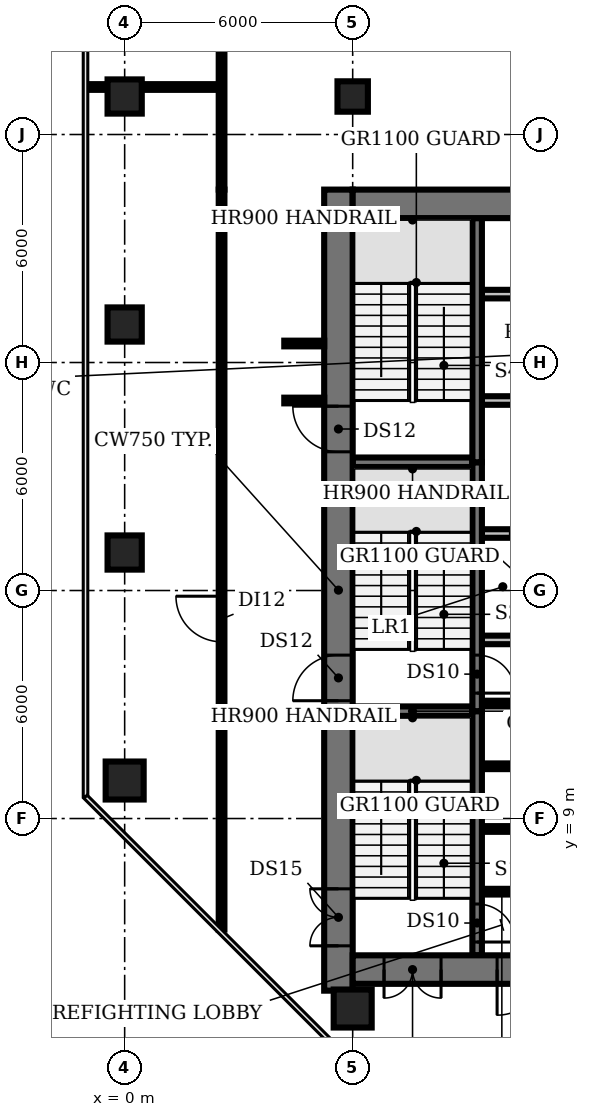
"""IFC4 building model, lengths in metres.
Left out: names, types, materials, properties, quantities, classifications, styles, units other than length and angle.
Written with IfcOpenShell. Run it as: python <this file> out.ifc"""

import sys

from ifc_helpers import new_model, si_unit, direction, frame, frame_2d, origin, origin_2d, place, context, subcontext, project, spatial, rectangle, circle, extrude, element, fill, save


model = new_model("IFC4")
c1 = context("Model", 3, precision=1e-05, world=origin(), true_north=direction((0.0, 1.0)))
c2 = subcontext(c1, "Body", "Model", "MODEL_VIEW")
j1 = project(units=[si_unit("LENGTHUNIT", "METRE"), si_unit("PLANEANGLEUNIT", "RADIAN")], contexts=[c1])
p1 = place(None, origin())
s1 = spatial("IfcSite", under=j1, at=p1, CompositionType="ELEMENT")
p2 = place(p1, origin())
s2 = spatial("IfcBuilding", under=s1, at=p2, CompositionType="ELEMENT")
p3 = place(p2, frame((0.0, 0.0, 92.0)))
s3 = spatial("IfcBuildingStorey", under=s2, at=p3, CompositionType="ELEMENT", Elevation=92.0)
p4 = place(p3, frame((0.0, 10.0, 0.0), z_axis=(0.0, 0.0, 1.0), x_axis=(1.0, 0.0, 0.0)))
e1 = element("IfcColumn", 1, at=p4, inside=s3, PredefinedType="COLUMN", context=c2, shape_type="SweptSolid", body=[
    extrude(circle(Radius=0.5, at=origin_2d()), origin(), (0.0, 0.0, 1.0), 3.85),
])
for number, where, z_axis, x_axis in (
    (2, (0.0, 16.0, 0.0), (0.0, 0.0, 1.0), (1.0, 0.0, 0.0)),
    (3, (0.0, 22.0, 0.0), (0.0, 0.0, 1.0), (1.0, 0.0, 0.0)),
    (4, (0.0, 28.0, 0.0), (0.0, 0.0, 1.0), (1.0, 0.0, 0.0)),
):
    element("IfcColumn", number, at=place(p3, frame(where, z_axis=z_axis, x_axis=x_axis)), inside=s3, PredefinedType="COLUMN", context=c2, shape_type="SweptSolid", body=[
        extrude(rectangle(XDim=0.9, YDim=0.9, at=origin_2d()), origin(), (0.0, 0.0, 1.0), 3.85),
    ])
p5 = place(p3, frame((6.0, 4.0, 0.0), z_axis=(0.0, 0.0, 1.0), x_axis=(1.0, 0.0, 0.0)))
e5 = element("IfcColumn", 5, at=p5, inside=s3, PredefinedType="COLUMN", context=c2, shape_type="SweptSolid", body=[
    extrude(circle(Radius=0.5, at=origin_2d()), origin(), (0.0, 0.0, 1.0), 3.85),
])
p6 = place(p3, frame((6.0, 28.0, 0.0), z_axis=(0.0, 0.0, 1.0), x_axis=(1.0, 0.0, 0.0)))
e6 = element("IfcColumn", 6, at=p6, inside=s3, PredefinedType="COLUMN", context=c2, shape_type="SweptSolid", body=[
    extrude(rectangle(XDim=0.8, YDim=0.8, at=origin_2d()), origin(), (0.0, 0.0, 1.0), 3.85),
])
for number, where, z_axis, x_axis in (
    (7, (9.4, 7.075, 0.0), (0.0, 0.0, 1.0), (1.0, 0.0, 0.0)),
    (8, (9.4, 8.725, 0.0), (0.0, 0.0, 1.0), (1.0, 0.0, 0.0)),
    (9, (9.4, 10.375, 0.0), (0.0, 0.0, 1.0), (1.0, 0.0, 0.0)),
):
    element("IfcWall", number, at=place(p3, frame(where, z_axis=z_axis, x_axis=x_axis)), inside=s3, PredefinedType="SHEAR", context=c2, shape_type="SweptSolid", body=[
        extrude(rectangle(XDim=1.05, YDim=0.15, at=frame_2d((0.525, 0.0))), origin(), (0.0, 0.0, 1.0), 3.85),
    ])
p7 = place(p3, frame((6.0, 11.825, 0.0), z_axis=(0.0, 0.0, 1.0), x_axis=(1.0, 0.0, 0.0)))
e10 = element("IfcWall", 10, at=p7, inside=s3, PredefinedType="SHEAR", context=c2, shape_type="SweptSolid", body=[
    extrude(rectangle(XDim=3.15, YDim=0.25, at=frame_2d((1.575, 0.0))), origin(), (0.0, 0.0, 1.0), 3.85),
])
p8 = place(p3, frame((9.4, 12.025, 0.0), z_axis=(0.0, 0.0, 1.0), x_axis=(1.0, 0.0, 0.0)))
e11 = element("IfcWall", 11, at=p8, inside=s3, PredefinedType="SHEAR", context=c2, shape_type="SweptSolid", body=[
    extrude(rectangle(XDim=1.05, YDim=0.15, at=frame_2d((0.525, 0.0))), origin(), (0.0, 0.0, 1.0), 3.85),
])
p9 = place(p3, frame((9.4, 13.7, 0.0), z_axis=(0.0, 0.0, 1.0), x_axis=(1.0, 0.0, 0.0)))
e12 = element("IfcWall", 12, at=p9, inside=s3, PredefinedType="PARTITIONING", context=c2, shape_type="SweptSolid", body=[
    extrude(rectangle(XDim=4.0, YDim=0.225, at=frame_2d((2.0, 0.0))), origin(), (0.0, 0.0, 1.0), 3.85),
])
p10 = place(p3, frame((9.4, 16.5, 0.0), z_axis=(0.0, 0.0, 1.0), x_axis=(1.0, 0.0, 0.0)))
e13 = element("IfcWall", 13, at=p10, inside=s3, PredefinedType="PARTITIONING", context=c2, shape_type="SweptSolid", body=[
    extrude(rectangle(XDim=14.6, YDim=0.225, at=frame_2d((7.3, 0.0))), origin(), (0.0, 0.0, 1.0), 3.85),
])
p11 = place(p10, frame((0.75, 0.0, 0.0)))
e14 = element("IfcOpeningElement", 14, at=p11, cuts=e13, PredefinedType="OPENING", context=c2, shape_type="SweptSolid", body=[
    extrude(rectangle(XDim=1.1, YDim=2.1, at=frame_2d((0.55, 1.05))), frame((0.0, 0.123, 0.0), z_axis=(0.0, -1.0, 0.0), x_axis=(1.0, 0.0, 0.0)), (0.0, 0.0, 1.0), 0.245),
])
p12 = place(p10, frame((3.55, 0.0, 0.0)))
e15 = element("IfcOpeningElement", 15, at=p12, cuts=e13, PredefinedType="OPENING", context=c2, shape_type="SweptSolid", body=[
    extrude(rectangle(XDim=1.1, YDim=2.1, at=frame_2d((0.55, 1.05))), frame((0.0, 0.123, 0.0), z_axis=(0.0, -1.0, 0.0), x_axis=(1.0, 0.0, 0.0)), (0.0, 0.0, 1.0), 0.245),
])
p13 = place(p10, frame((6.35, 0.0, 0.0)))
e16 = element("IfcOpeningElement", 16, at=p13, cuts=e13, PredefinedType="OPENING", context=c2, shape_type="SweptSolid", body=[
    extrude(rectangle(XDim=1.1, YDim=2.1, at=frame_2d((0.55, 1.05))), frame((0.0, 0.123, 0.0), z_axis=(0.0, -1.0, 0.0), x_axis=(1.0, 0.0, 0.0)), (0.0, 0.0, 1.0), 0.245),
])
p14 = place(p10, frame((9.15, 0.0, 0.0)))
e17 = element("IfcOpeningElement", 17, at=p14, cuts=e13, PredefinedType="OPENING", context=c2, shape_type="SweptSolid", body=[
    extrude(rectangle(XDim=1.1, YDim=2.1, at=frame_2d((0.55, 1.05))), frame((0.0, 0.123, 0.0), z_axis=(0.0, -1.0, 0.0), x_axis=(1.0, 0.0, 0.0)), (0.0, 0.0, 1.0), 0.245),
])
p15 = place(p10, frame((12.4, 0.0, 0.0)))
e18 = element("IfcOpeningElement", 18, at=p15, cuts=e13, PredefinedType="OPENING", context=c2, shape_type="SweptSolid", body=[
    extrude(rectangle(XDim=1.0, YDim=2.1, at=frame_2d((0.5, 1.05))), frame((0.0, 0.123, 0.0), z_axis=(0.0, -1.0, 0.0), x_axis=(1.0, 0.0, 0.0)), (0.0, 0.0, 1.0), 0.245),
])
p16 = place(p3, frame((6.0, 18.375, 0.0), z_axis=(0.0, 0.0, 1.0), x_axis=(1.0, 0.0, 0.0)))
e19 = element("IfcWall", 19, at=p16, inside=s3, PredefinedType="SHEAR", context=c2, shape_type="SweptSolid", body=[
    extrude(rectangle(XDim=3.15, YDim=0.25, at=frame_2d((1.575, 0.0))), origin(), (0.0, 0.0, 1.0), 3.85),
])
p17 = place(p3, frame((24.0, 20.0, 0.0), z_axis=(0.0, 0.0, 1.0), x_axis=(-1.0, 0.0, 0.0)))
e20 = element("IfcWall", 20, at=p17, inside=s3, PredefinedType="PARTITIONING", context=c2, shape_type="SweptSolid", body=[
    extrude(rectangle(XDim=14.6, YDim=0.225, at=frame_2d((7.3, 0.0))), origin(), (0.0, 0.0, 1.0), 3.85),
])
p18 = place(p17, frame((12.5, 0.0, 0.0)))
e21 = element("IfcOpeningElement", 21, at=p18, cuts=e20, PredefinedType="OPENING", context=c2, shape_type="SweptSolid", body=[
    extrude(rectangle(XDim=1.0, YDim=2.1, at=frame_2d((0.5, 1.05))), frame((0.0, 0.123, 0.0), z_axis=(0.0, -1.0, 0.0), x_axis=(1.0, 0.0, 0.0)), (0.0, 0.0, 1.0), 0.245),
])
p19 = place(p17, frame((8.825, 0.0, 0.0)))
e22 = element("IfcOpeningElement", 22, at=p19, cuts=e20, PredefinedType="OPENING", context=c2, shape_type="SweptSolid", body=[
    extrude(rectangle(XDim=1.0, YDim=2.1, at=frame_2d((0.5, 1.05))), frame((0.0, 0.123, 0.0), z_axis=(0.0, -1.0, 0.0), x_axis=(1.0, 0.0, 0.0)), (0.0, 0.0, 1.0), 0.245),
])
p20 = place(p17, frame((4.925, 0.0, 0.0)))
e23 = element("IfcOpeningElement", 23, at=p20, cuts=e20, PredefinedType="OPENING", context=c2, shape_type="SweptSolid", body=[
    extrude(rectangle(XDim=1.0, YDim=2.1, at=frame_2d((0.5, 1.05))), frame((0.0, 0.123, 0.0), z_axis=(0.0, -1.0, 0.0), x_axis=(1.0, 0.0, 0.0)), (0.0, 0.0, 1.0), 0.245),
])
p21 = place(p17, frame((1.2, 0.0, 0.0)))
e24 = element("IfcOpeningElement", 24, at=p21, cuts=e20, PredefinedType="OPENING", context=c2, shape_type="SweptSolid", body=[
    extrude(rectangle(XDim=1.0, YDim=2.1, at=frame_2d((0.5, 1.05))), frame((0.0, 0.123, 0.0), z_axis=(0.0, -1.0, 0.0), x_axis=(1.0, 0.0, 0.0)), (0.0, 0.0, 1.0), 0.245),
])
p22 = place(p3, frame((9.4, 22.8, 0.0), z_axis=(0.0, 0.0, 1.0), x_axis=(1.0, 0.0, 0.0)))
e25 = element("IfcWall", 25, at=p22, inside=s3, PredefinedType="PARTITIONING", context=c2, shape_type="SweptSolid", body=[
    extrude(rectangle(XDim=14.6, YDim=0.225, at=frame_2d((7.3, 0.0))), origin(), (0.0, 0.0, 1.0), 3.85),
])
p23 = place(p3, frame((9.275, 11.825, 0.0), z_axis=(0.0, 0.0, 1.0), x_axis=(0.0, -1.0, 0.0)))
e26 = element("IfcWall", 26, at=p23, inside=s3, PredefinedType="SHEAR", context=c2, shape_type="SweptSolid", body=[
    extrude(rectangle(XDim=6.425, YDim=0.25, at=frame_2d((3.212, 0.0))), origin(), (0.0, 0.0, 1.0), 3.85),
])
p24 = place(p23, frame((5.075, 0.0, 0.0)))
e27 = element("IfcOpeningElement", 27, at=p24, cuts=e26, PredefinedType="OPENING", context=c2, shape_type="SweptSolid", body=[
    extrude(rectangle(XDim=1.0, YDim=2.1, at=frame_2d((0.5, 1.05))), frame((0.0, 0.135, 0.0), z_axis=(0.0, -1.0, 0.0), x_axis=(1.0, 0.0, 0.0)), (0.0, 0.0, 1.0), 0.27),
])
p25 = place(p3, frame((9.275, 18.375, 0.0), z_axis=(0.0, 0.0, 1.0), x_axis=(0.0, -1.0, 0.0)))
e28 = element("IfcWall", 28, at=p25, inside=s3, PredefinedType="SHEAR", context=c2, shape_type="SweptSolid", body=[
    extrude(rectangle(XDim=6.55, YDim=0.25, at=frame_2d((3.275, 0.0))), origin(), (0.0, 0.0, 1.0), 3.85),
])
p26 = place(p25, frame((5.075, 0.0, 0.0)))
e29 = element("IfcOpeningElement", 29, at=p26, cuts=e28, PredefinedType="OPENING", context=c2, shape_type="SweptSolid", body=[
    extrude(rectangle(XDim=1.0, YDim=2.1, at=frame_2d((0.5, 1.05))), frame((0.0, 0.135, 0.0), z_axis=(0.0, -1.0, 0.0), x_axis=(1.0, 0.0, 0.0)), (0.0, 0.0, 1.0), 0.27),
])
p27 = place(p3, frame((9.275, 18.375, 0.0), z_axis=(0.0, 0.0, 1.0), x_axis=(0.0, 1.0, 0.0)))
e30 = element("IfcWall", 30, at=p27, inside=s3, PredefinedType="SHEAR", context=c2, shape_type="SweptSolid", body=[
    extrude(rectangle(XDim=6.425, YDim=0.25, at=frame_2d((3.212, 0.0))), origin(), (0.0, 0.0, 1.0), 3.85),
])
p28 = place(p3, frame((5.625, 4.47, 0.0), z_axis=(0.0, 0.0, 1.0), x_axis=(0.0, 1.0, 0.0)))
e31 = element("IfcWall", 31, at=p28, inside=s3, PredefinedType="SHEAR", context=c2, shape_type="SweptSolid", body=[
    extrude(rectangle(XDim=21.08, YDim=0.75, at=frame_2d((10.54, 0.0))), origin(), (0.0, 0.0, 1.0), 3.85),
])
p29 = place(p28, frame((1.18, 0.0, 0.0)))
e32 = element("IfcOpeningElement", 32, at=p29, cuts=e31, PredefinedType="OPENING", context=c2, shape_type="SweptSolid", body=[
    extrude(rectangle(XDim=1.5, YDim=2.1, at=frame_2d((0.75, 1.05))), frame((0.0, 0.385, 0.0), z_axis=(0.0, -1.0, 0.0), x_axis=(1.0, 0.0, 0.0)), (0.0, 0.0, 1.0), 0.77),
])
p30 = place(p28, frame((7.63, 0.0, 0.0)))
e33 = element("IfcOpeningElement", 33, at=p30, cuts=e31, PredefinedType="OPENING", context=c2, shape_type="SweptSolid", body=[
    extrude(rectangle(XDim=1.2, YDim=2.1, at=frame_2d((0.6, 1.05))), frame((0.0, 0.385, 0.0), z_axis=(0.0, -1.0, 0.0), x_axis=(1.0, 0.0, 0.0)), (0.0, 0.0, 1.0), 0.77),
])
p31 = place(p28, frame((14.18, 0.0, 0.0)))
e34 = element("IfcOpeningElement", 34, at=p31, cuts=e31, PredefinedType="OPENING", context=c2, shape_type="SweptSolid", body=[
    extrude(rectangle(XDim=1.2, YDim=2.1, at=frame_2d((0.6, 1.05))), frame((0.0, 0.385, 0.0), z_axis=(0.0, -1.0, 0.0), x_axis=(1.0, 0.0, 0.0)), (0.0, 0.0, 1.0), 0.77),
])
p32 = place(p3, frame((24.0, 5.025, 0.0), z_axis=(0.0, 0.0, 1.0), x_axis=(-1.0, 0.0, 0.0)))
e35 = element("IfcWall", 35, at=p32, inside=s3, PredefinedType="SHEAR", context=c2, shape_type="SweptSolid", body=[
    extrude(rectangle(XDim=18.0, YDim=0.75, at=frame_2d((9.0, 0.0))), origin(), (0.0, 0.0, 1.0), 3.85),
])
p33 = place(p32, frame((0.825, 0.0, 0.0)))
e36 = element("IfcOpeningElement", 36, at=p33, cuts=e35, PredefinedType="OPENING", context=c2, shape_type="SweptSolid", body=[
    extrude(rectangle(XDim=1.5, YDim=2.1, at=frame_2d((0.75, 1.05))), frame((0.0, 0.385, 0.0), z_axis=(0.0, -1.0, 0.0), x_axis=(1.0, 0.0, 0.0)), (0.0, 0.0, 1.0), 0.77),
])
p34 = place(p32, frame((15.675, 0.0, 0.0)))
e37 = element("IfcOpeningElement", 37, at=p34, cuts=e35, PredefinedType="OPENING", context=c2, shape_type="SweptSolid", body=[
    extrude(rectangle(XDim=1.5, YDim=2.1, at=frame_2d((0.75, 1.05))), frame((0.0, 0.385, 0.0), z_axis=(0.0, -1.0, 0.0), x_axis=(1.0, 0.0, 0.0)), (0.0, 0.0, 1.0), 0.77),
])
p35 = place(p32, frame((13.0, 0.0, 0.0)))
e38 = element("IfcOpeningElement", 38, at=p35, cuts=e35, PredefinedType="OPENING", context=c2, shape_type="SweptSolid", body=[
    extrude(rectangle(XDim=1.2, YDim=2.1, at=frame_2d((0.6, 1.05))), frame((0.0, 0.385, 0.0), z_axis=(0.0, -1.0, 0.0), x_axis=(1.0, 0.0, 0.0)), (0.0, 0.0, 1.0), 0.77),
])
p36 = place(p32, frame((4.35, 0.0, 0.0)))
e39 = element("IfcOpeningElement", 39, at=p36, cuts=e35, PredefinedType="OPENING", context=c2, shape_type="SweptSolid", body=[
    extrude(rectangle(XDim=1.0, YDim=2.1, at=frame_2d((0.5, 1.05))), frame((0.0, 0.385, 0.0), z_axis=(0.0, -1.0, 0.0), x_axis=(1.0, 0.0, 0.0)), (0.0, 0.0, 1.0), 0.77),
])
p37 = place(p3, frame((6.0, 25.175, 0.0), z_axis=(0.0, 0.0, 1.0), x_axis=(1.0, 0.0, 0.0)))
e40 = element("IfcWall", 40, at=p37, inside=s3, PredefinedType="SHEAR", context=c2, shape_type="SweptSolid", body=[
    extrude(rectangle(XDim=18.0, YDim=0.75, at=frame_2d((9.0, 0.0))), origin(), (0.0, 0.0, 1.0), 3.85),
])
p38 = place(p3, frame((-0.98, 28.25, 0.0), z_axis=(0.0, 0.0, 1.0), x_axis=(1.0, 0.0, 0.0)))
e41 = element("IfcWall", 41, at=p38, inside=s3, PredefinedType="PARTITIONING", context=c2, shape_type="SweptSolid", body=[
    extrude(rectangle(XDim=3.53, YDim=0.15, at=frame_2d((1.765, 0.0))), origin(), (0.0, 0.0, 1.0), 2.83),
])
p39 = place(p3, frame((2.55, 6.078, 0.0), z_axis=(0.0, 0.0, 1.0), x_axis=(0.0, 1.0, 0.0)))
e42 = element("IfcWall", 42, at=p39, inside=s3, PredefinedType="PARTITIONING", context=c2, shape_type="SweptSolid", body=[
    extrude(rectangle(XDim=19.472, YDim=0.15, at=frame_2d((9.736, 0.0))), origin(), (0.0, 0.0, 1.0), 2.83),
])
p40 = place(p39, frame((7.572, 0.0, 0.0)))
e43 = element("IfcOpeningElement", 43, at=p40, cuts=e42, PredefinedType="OPENING", context=c2, shape_type="SweptSolid", body=[
    extrude(rectangle(XDim=1.2, YDim=2.1, at=frame_2d((0.6, 1.05))), frame((0.0, 0.085, 0.0), z_axis=(0.0, -1.0, 0.0), x_axis=(1.0, 0.0, 0.0)), (0.0, 0.0, 1.0), 0.17),
])
p41 = place(p3, frame((2.55, 25.55, 0.0), z_axis=(0.0, 0.0, 1.0), x_axis=(0.0, 1.0, 0.0)))
e44 = element("IfcWall", 44, at=p41, inside=s3, PredefinedType="PARTITIONING", context=c2, shape_type="SweptSolid", body=[
    extrude(rectangle(XDim=3.9, YDim=0.15, at=frame_2d((1.95, 0.0))), origin(), (0.0, 0.0, 1.0), 2.83),
])
for number, where, z_axis, x_axis in (
    (45, (4.2, 20.0, 0.0), (0.0, 0.0, 1.0), (1.0, 0.0, 0.0)),
    (46, (4.2, 21.5, 0.0), (0.0, 0.0, 1.0), (1.0, 0.0, 0.0)),
):
    element("IfcWall", number, at=place(p3, frame(where, z_axis=z_axis, x_axis=x_axis)), inside=s3, PredefinedType="PARTITIONING", context=c2, shape_type="SweptSolid", body=[
        extrude(rectangle(XDim=1.05, YDim=0.15, at=frame_2d((0.525, 0.0))), origin(), (0.0, 0.0, 1.0), 2.83),
    ])
p42 = place(p24, origin())
e47 = element("IfcDoor", 47, at=p42, inside=s3, OperationType="SINGLE_SWING_RIGHT", PredefinedType="DOOR", context=c2, shape_type="SweptSolid", body=[
    extrude(rectangle(XDim=1.0, YDim=2.1, at=frame_2d((0.5, 1.05))), frame((0.0, 0.025, 0.0), z_axis=(0.0, -1.0, 0.0), x_axis=(1.0, 0.0, 0.0)), (0.0, 0.0, 1.0), 0.05),
])
fill(e27, e47)
p43 = place(p26, origin())
e48 = element("IfcDoor", 48, at=p43, inside=s3, OperationType="SINGLE_SWING_RIGHT", PredefinedType="DOOR", context=c2, shape_type="SweptSolid", body=[
    extrude(rectangle(XDim=1.0, YDim=2.1, at=frame_2d((0.5, 1.05))), frame((0.0, 0.025, 0.0), z_axis=(0.0, -1.0, 0.0), x_axis=(1.0, 0.0, 0.0)), (0.0, 0.0, 1.0), 0.05),
])
fill(e29, e48)
p44 = place(p29, origin())
e49 = element("IfcDoor", 49, at=p44, inside=s3, OperationType="DOUBLE_DOOR_SINGLE_SWING", PredefinedType="DOOR", context=c2, shape_type="SweptSolid", body=[
    extrude(rectangle(XDim=1.5, YDim=2.1, at=frame_2d((0.75, 1.05))), frame((0.0, 0.025, 0.0), z_axis=(0.0, -1.0, 0.0), x_axis=(1.0, 0.0, 0.0)), (0.0, 0.0, 1.0), 0.05),
])
fill(e32, e49)
p45 = place(p30, origin())
e50 = element("IfcDoor", 50, at=p45, inside=s3, OperationType="SINGLE_SWING_LEFT", PredefinedType="DOOR", context=c2, shape_type="SweptSolid", body=[
    extrude(rectangle(XDim=1.2, YDim=2.1, at=frame_2d((0.6, 1.05))), frame((0.0, 0.025, 0.0), z_axis=(0.0, -1.0, 0.0), x_axis=(1.0, 0.0, 0.0)), (0.0, 0.0, 1.0), 0.05),
])
fill(e33, e50)
p46 = place(p31, origin())
e51 = element("IfcDoor", 51, at=p46, inside=s3, OperationType="SINGLE_SWING_RIGHT", PredefinedType="DOOR", context=c2, shape_type="SweptSolid", body=[
    extrude(rectangle(XDim=1.2, YDim=2.1, at=frame_2d((0.6, 1.05))), frame((0.0, 0.025, 0.0), z_axis=(0.0, -1.0, 0.0), x_axis=(1.0, 0.0, 0.0)), (0.0, 0.0, 1.0), 0.05),
])
fill(e34, e51)
p47 = place(p34, origin())
e52 = element("IfcDoor", 52, at=p47, inside=s3, OperationType="DOUBLE_DOOR_SINGLE_SWING", PredefinedType="DOOR", context=c2, shape_type="SweptSolid", body=[
    extrude(rectangle(XDim=1.5, YDim=2.1, at=frame_2d((0.75, 1.05))), frame((0.0, 0.025, 0.0), z_axis=(0.0, -1.0, 0.0), x_axis=(1.0, 0.0, 0.0)), (0.0, 0.0, 1.0), 0.05),
])
fill(e37, e52)
p48 = place(p35, origin())
e53 = element("IfcDoor", 53, at=p48, inside=s3, OperationType="SINGLE_SWING_RIGHT", PredefinedType="DOOR", context=c2, shape_type="SweptSolid", body=[
    extrude(rectangle(XDim=1.2, YDim=2.1, at=frame_2d((0.6, 1.05))), frame((0.0, 0.025, 0.0), z_axis=(0.0, -1.0, 0.0), x_axis=(1.0, 0.0, 0.0)), (0.0, 0.0, 1.0), 0.05),
])
fill(e38, e53)
p49 = place(p40, origin())
e54 = element("IfcDoor", 54, at=p49, inside=s3, OperationType="SINGLE_SWING_RIGHT", PredefinedType="DOOR", context=c2, shape_type="SweptSolid", body=[
    extrude(rectangle(XDim=1.2, YDim=2.1, at=frame_2d((0.6, 1.05))), frame((0.0, 0.025, 0.0), z_axis=(0.0, -1.0, 0.0), x_axis=(1.0, 0.0, 0.0)), (0.0, 0.0, 1.0), 0.05),
])
fill(e43, e54)
save(model, sys.argv[1])
